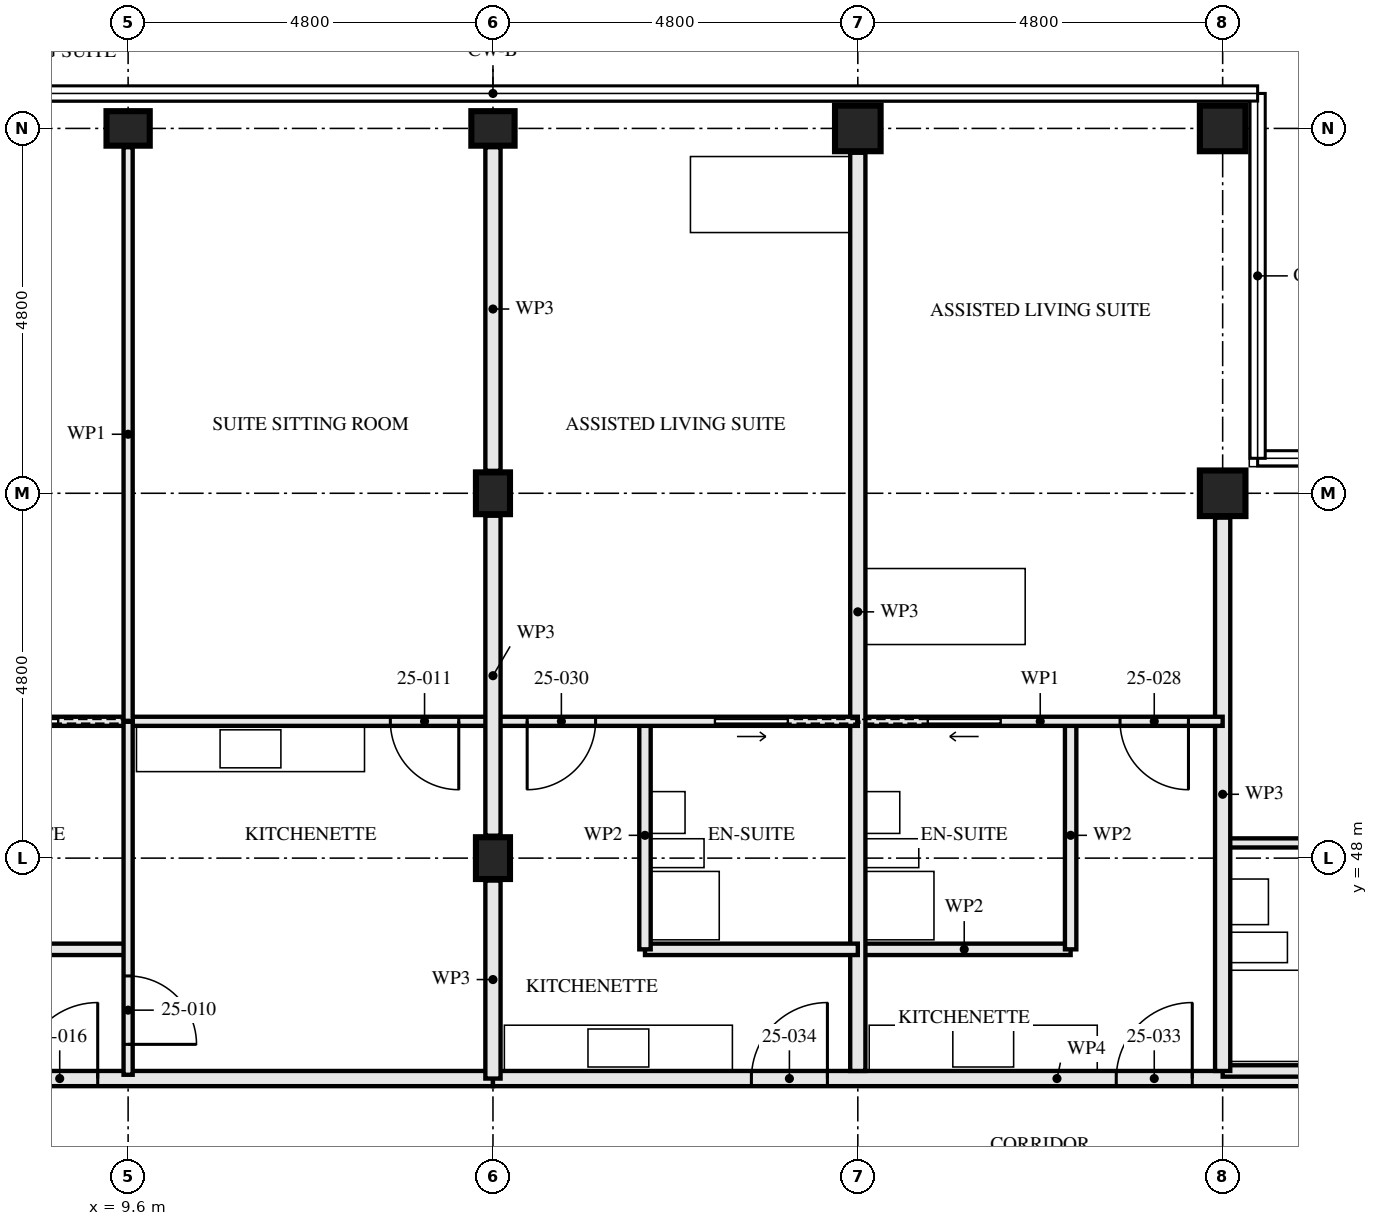
"""IFC4 building model, lengths in metres.
Left out: names, types, materials, properties, quantities, classifications, styles, units other than length and angle.
Written with IfcOpenShell. Run it as: python <this file> out.ifc"""

import sys

from ifc_helpers import new_model, si_unit, direction, frame, frame_2d, origin, origin_2d, place, context, subcontext, project, spatial, rectangle, hollow_rectangle, i_section, extrude, element, fill, save


model = new_model("IFC4")
c1 = context("Model", 3, precision=1e-05, world=origin(), true_north=direction((0.0, 1.0)))
c2 = subcontext(c1, "Body", "Model", "MODEL_VIEW")
j1 = project(units=[si_unit("LENGTHUNIT", "METRE"), si_unit("PLANEANGLEUNIT", "RADIAN")], contexts=[c1])
p1 = place(None, origin())
s1 = spatial("IfcSite", under=j1, at=p1, CompositionType="ELEMENT")
p2 = place(p1, origin())
s2 = spatial("IfcBuilding", under=s1, at=p2, CompositionType="ELEMENT")
p3 = place(p2, frame((0.0, 0.0, 94.5)))
s3 = spatial("IfcBuildingStorey", under=s2, at=p3, CompositionType="ELEMENT", Elevation=94.5)
p4 = place(p3, frame((9.6, 57.6, 0.0), z_axis=(0.0, 0.0, 1.0), x_axis=(0.0, 1.0, 0.0)))
e1 = element("IfcColumn", 1, at=p4, inside=s3, PredefinedType="COLUMN", context=c2, shape_type="SweptSolid", body=[
    extrude(i_section(OverallWidth=0.454, OverallDepth=0.569, WebThickness=0.078, FlangeThickness=0.125, FilletRadius=0.015, at=origin_2d()), origin(), (0.0, 0.0, 1.0), 3.5),
])
for number, where, z_axis, x_axis in (
    (2, (14.4, 48.0, 0.0), (0.0, 0.0, 1.0), (1.0, 0.0, 0.0)),
    (3, (14.4, 52.8, 0.0), (0.0, 0.0, 1.0), (1.0, 0.0, 0.0)),
):
    element("IfcColumn", number, at=place(p3, frame(where, z_axis=z_axis, x_axis=x_axis)), inside=s3, PredefinedType="COLUMN", context=c2, shape_type="SweptSolid", body=[
        extrude(i_section(OverallWidth=0.448, OverallDepth=0.55, WebThickness=0.072, FlangeThickness=0.115, FilletRadius=0.015, at=origin_2d()), origin(), (0.0, 0.0, 1.0), 3.5),
    ])
p5 = place(p3, frame((14.4, 57.6, 0.0), z_axis=(0.0, 0.0, 1.0), x_axis=(0.0, 1.0, 0.0)))
e4 = element("IfcColumn", 4, at=p5, inside=s3, PredefinedType="COLUMN", context=c2, shape_type="SweptSolid", body=[
    extrude(i_section(OverallWidth=0.454, OverallDepth=0.569, WebThickness=0.078, FlangeThickness=0.125, FilletRadius=0.015, at=origin_2d()), origin(), (0.0, 0.0, 1.0), 3.5),
])
for number, where, z_axis, x_axis in (
    (5, (19.2, 57.6, 0.0), (0.0, 0.0, 1.0), (0.0, 1.0, 0.0)),
    (6, (24.0, 52.8, 0.0), (0.0, 0.0, 1.0), (0.0, 1.0, 0.0)),
    (7, (24.0, 57.6, 0.0), (0.0, 0.0, 1.0), (0.0, 1.0, 0.0)),
):
    element("IfcColumn", number, at=place(p3, frame(where, z_axis=z_axis, x_axis=x_axis)), inside=s3, PredefinedType="COLUMN", context=c2, shape_type="SweptSolid", body=[
        extrude(hollow_rectangle(XDim=0.6, YDim=0.6, WallThickness=0.06, at=origin_2d()), origin(), (0.0, 0.0, 1.0), 3.5),
    ])
p6 = place(p3, frame((9.6, 46.8, 0.0), z_axis=(0.0, 0.0, 1.0), x_axis=(-1.0, 0.0, 0.0)))
e8 = element("IfcWall", 8, at=p6, inside=s3, PredefinedType="PARTITIONING", context=c2, shape_type="SweptSolid", body=[
    extrude(rectangle(XDim=2.8, YDim=0.15, at=frame_2d((1.4, 0.0))), origin(), (0.0, 0.0, 1.0), 3.33),
])
p7 = place(p3, frame((9.6, 49.8, 0.0), z_axis=(0.0, 0.0, 1.0), x_axis=(0.0, -1.0, 0.0)))
e9 = element("IfcWall", 9, at=p7, inside=s3, PredefinedType="PARTITIONING", context=c2, shape_type="SweptSolid", body=[
    extrude(rectangle(XDim=4.65, YDim=0.12, at=frame_2d((2.325, 0.0))), origin(), (0.0, 0.0, 1.0), 2.55),
])
p8 = place(p7, frame((3.35, 0.0, 0.0)))
e10 = element("IfcOpeningElement", 10, at=p8, cuts=e9, PredefinedType="OPENING", context=c2, shape_type="SweptSolid", body=[
    extrude(rectangle(XDim=0.9, YDim=2.1, at=frame_2d((0.45, 1.05))), frame((0.0, 0.071, 0.0), z_axis=(0.0, -1.0, 0.0), x_axis=(1.0, 0.0, 0.0)), (0.0, 0.0, 1.0), 0.141),
])
p9 = place(p3, frame((14.4, 49.8, 0.0), z_axis=(0.0, 0.0, 1.0), x_axis=(-1.0, 0.0, 0.0)))
e11 = element("IfcWall", 11, at=p9, inside=s3, PredefinedType="PARTITIONING", context=c2, shape_type="SweptSolid", body=[
    extrude(rectangle(XDim=4.8, YDim=0.12, at=frame_2d((2.4, 0.0))), origin(), (0.0, 0.0, 1.0), 3.33),
])
p10 = place(p9, frame((0.45, 0.0, 0.0)))
e12 = element("IfcOpeningElement", 12, at=p10, cuts=e11, PredefinedType="OPENING", context=c2, shape_type="SweptSolid", body=[
    extrude(rectangle(XDim=0.9, YDim=2.1, at=frame_2d((0.45, 1.05))), frame((0.0, 0.071, 0.0), z_axis=(0.0, -1.0, 0.0), x_axis=(1.0, 0.0, 0.0)), (0.0, 0.0, 1.0), 0.141),
])
p11 = place(p3, frame((9.6, 49.8, 0.0), z_axis=(0.0, 0.0, 1.0), x_axis=(-1.0, 0.0, 0.0)))
e13 = element("IfcWall", 13, at=p11, inside=s3, PredefinedType="PARTITIONING", context=c2, shape_type="SweptSolid", body=[
    extrude(rectangle(XDim=4.8, YDim=0.12, at=frame_2d((2.4, 0.0))), origin(), (0.0, 0.0, 1.0), 3.33),
])
p12 = place(p11, frame((3.45, 0.0, 0.0)))
e14 = element("IfcOpeningElement", 14, at=p12, cuts=e13, PredefinedType="OPENING", context=c2, shape_type="SweptSolid", body=[
    extrude(rectangle(XDim=0.9, YDim=2.1, at=frame_2d((0.45, 1.05))), frame((0.0, 0.071, 0.0), z_axis=(0.0, -1.0, 0.0), x_axis=(1.0, 0.0, 0.0)), (0.0, 0.0, 1.0), 0.141),
])
p13 = place(p11, frame((0.925, 0.0, 0.0)))
e15 = element("IfcOpeningElement", 15, at=p13, cuts=e13, PredefinedType="OPENING", context=c2, shape_type="SweptSolid", body=[
    extrude(rectangle(XDim=0.95, YDim=2.1, at=frame_2d((0.475, 1.05))), frame((0.0, 0.071, 0.0), z_axis=(0.0, -1.0, 0.0), x_axis=(1.0, 0.0, 0.0)), (0.0, 0.0, 1.0), 0.141),
])
p14 = place(p3, frame((9.6, 57.353, 0.0), z_axis=(0.0, 0.0, 1.0), x_axis=(0.0, -1.0, 0.0)))
e16 = element("IfcWall", 16, at=p14, inside=s3, PredefinedType="PARTITIONING", context=c2, shape_type="SweptSolid", body=[
    extrude(rectangle(XDim=7.553, YDim=0.12, at=frame_2d((3.776, 0.0))), origin(), (0.0, 0.0, 1.0), 2.55),
])
p15 = place(p3, frame((14.4, 45.1, 0.0), z_axis=(0.0, 0.0, 1.0), x_axis=(-1.0, 0.0, 0.0)))
e17 = element("IfcWall", 17, at=p15, inside=s3, PredefinedType="PARTITIONING", context=c2, shape_type="SweptSolid", body=[
    extrude(rectangle(XDim=9.6, YDim=0.2, at=frame_2d((4.8, 0.0))), origin(), (0.0, 0.0, 1.0), 3.33),
])
p16 = place(p15, frame((5.2, 0.0, 0.0)))
e18 = element("IfcOpeningElement", 18, at=p16, cuts=e17, PredefinedType="OPENING", context=c2, shape_type="SweptSolid", body=[
    extrude(rectangle(XDim=1.0, YDim=2.1, at=frame_2d((0.5, 1.05))), frame((0.0, 0.111, 0.0), z_axis=(0.0, -1.0, 0.0), x_axis=(1.0, 0.0, 0.0)), (0.0, 0.0, 1.0), 0.221),
])
p17 = place(p3, frame((26.8, 45.2, 0.0), z_axis=(0.0, 0.0, 1.0), x_axis=(-1.0, 0.0, 0.0)))
e19 = element("IfcWall", 19, at=p17, inside=s3, PredefinedType="PARTITIONING", context=c2, shape_type="SweptSolid", body=[
    extrude(rectangle(XDim=2.8, YDim=0.15, at=frame_2d((1.4, 0.0))), origin(), (0.0, 0.0, 1.0), 3.33),
])
p18 = place(p3, frame((28.48, 48.2, 0.0), z_axis=(0.0, 0.0, 1.0), x_axis=(-1.0, 0.0, 0.0)))
e20 = element("IfcWall", 20, at=p18, inside=s3, PredefinedType="PARTITIONING", context=c2, shape_type="SweptSolid", body=[
    extrude(rectangle(XDim=4.48, YDim=0.12, at=frame_2d((2.24, 0.0))), origin(), (0.0, 0.0, 1.0), 3.33),
])
p19 = place(p18, frame((0.605, 0.0, 0.0)))
e21 = element("IfcOpeningElement", 21, at=p19, cuts=e20, PredefinedType="OPENING", context=c2, shape_type="SweptSolid", body=[
    extrude(rectangle(XDim=0.9, YDim=2.1, at=frame_2d((0.45, 1.05))), frame((0.0, 0.071, 0.0), z_axis=(0.0, -1.0, 0.0), x_axis=(1.0, 0.0, 0.0)), (0.0, 0.0, 1.0), 0.141),
])
p20 = place(p3, frame((24.0, 52.48, 0.0), z_axis=(0.0, 0.0, 1.0), x_axis=(0.0, -1.0, 0.0)))
e22 = element("IfcWall", 22, at=p20, inside=s3, PredefinedType="PARTITIONING", context=c2, shape_type="SweptSolid", body=[
    extrude(rectangle(XDim=7.28, YDim=0.2, at=frame_2d((3.64, 0.0))), origin(), (0.0, 0.0, 1.0), 2.55),
])
p21 = place(p3, frame((22.0, 49.8, 0.0), z_axis=(0.0, 0.0, 1.0), x_axis=(0.0, -1.0, 0.0)))
e23 = element("IfcWall", 23, at=p21, inside=s3, PredefinedType="PARTITIONING", context=c2, shape_type="SweptSolid", body=[
    extrude(rectangle(XDim=3.0, YDim=0.15, at=frame_2d((1.5, 0.0))), origin(), (0.0, 0.0, 1.0), 2.55),
])
p22 = place(p3, frame((22.0, 46.8, 0.0), z_axis=(0.0, 0.0, 1.0), x_axis=(-1.0, 0.0, 0.0)))
e24 = element("IfcWall", 24, at=p22, inside=s3, PredefinedType="PARTITIONING", context=c2, shape_type="SweptSolid", body=[
    extrude(rectangle(XDim=2.8, YDim=0.15, at=frame_2d((1.4, 0.0))), origin(), (0.0, 0.0, 1.0), 3.33),
])
p23 = place(p3, frame((24.0, 49.8, 0.0), z_axis=(0.0, 0.0, 1.0), x_axis=(-1.0, 0.0, 0.0)))
e25 = element("IfcWall", 25, at=p23, inside=s3, PredefinedType="PARTITIONING", context=c2, shape_type="SweptSolid", body=[
    extrude(rectangle(XDim=4.8, YDim=0.12, at=frame_2d((2.4, 0.0))), origin(), (0.0, 0.0, 1.0), 3.33),
])
p24 = place(p23, frame((0.45, 0.0, 0.0)))
e26 = element("IfcOpeningElement", 26, at=p24, cuts=e25, PredefinedType="OPENING", context=c2, shape_type="SweptSolid", body=[
    extrude(rectangle(XDim=0.9, YDim=2.1, at=frame_2d((0.45, 1.05))), frame((0.0, 0.071, 0.0), z_axis=(0.0, -1.0, 0.0), x_axis=(1.0, 0.0, 0.0)), (0.0, 0.0, 1.0), 0.141),
])
p25 = place(p23, frame((2.925, 0.0, 0.0)))
e27 = element("IfcOpeningElement", 27, at=p25, cuts=e25, PredefinedType="OPENING", context=c2, shape_type="SweptSolid", body=[
    extrude(rectangle(XDim=0.95, YDim=2.1, at=frame_2d((0.475, 1.05))), frame((0.0, 0.071, 0.0), z_axis=(0.0, -1.0, 0.0), x_axis=(1.0, 0.0, 0.0)), (0.0, 0.0, 1.0), 0.141),
])
p26 = place(p3, frame((19.2, 57.28, 0.0), z_axis=(0.0, 0.0, 1.0), x_axis=(0.0, -1.0, 0.0)))
e28 = element("IfcWall", 28, at=p26, inside=s3, PredefinedType="PARTITIONING", context=c2, shape_type="SweptSolid", body=[
    extrude(rectangle(XDim=12.08, YDim=0.2, at=frame_2d((6.04, 0.0))), origin(), (0.0, 0.0, 1.0), 2.55),
])
p27 = place(p3, frame((16.4, 49.8, 0.0), z_axis=(0.0, 0.0, 1.0), x_axis=(0.0, -1.0, 0.0)))
e29 = element("IfcWall", 29, at=p27, inside=s3, PredefinedType="PARTITIONING", context=c2, shape_type="SweptSolid", body=[
    extrude(rectangle(XDim=3.0, YDim=0.15, at=frame_2d((1.5, 0.0))), origin(), (0.0, 0.0, 1.0), 2.55),
])
p28 = place(p3, frame((19.2, 46.8, 0.0), z_axis=(0.0, 0.0, 1.0), x_axis=(-1.0, 0.0, 0.0)))
e30 = element("IfcWall", 30, at=p28, inside=s3, PredefinedType="PARTITIONING", context=c2, shape_type="SweptSolid", body=[
    extrude(rectangle(XDim=2.8, YDim=0.15, at=frame_2d((1.4, 0.0))), origin(), (0.0, 0.0, 1.0), 3.33),
])
p29 = place(p3, frame((19.2, 49.8, 0.0), z_axis=(0.0, 0.0, 1.0), x_axis=(-1.0, 0.0, 0.0)))
e31 = element("IfcWall", 31, at=p29, inside=s3, PredefinedType="PARTITIONING", context=c2, shape_type="SweptSolid", body=[
    extrude(rectangle(XDim=4.8, YDim=0.12, at=frame_2d((2.4, 0.0))), origin(), (0.0, 0.0, 1.0), 3.33),
])
p30 = place(p29, frame((3.45, 0.0, 0.0)))
e32 = element("IfcOpeningElement", 32, at=p30, cuts=e31, PredefinedType="OPENING", context=c2, shape_type="SweptSolid", body=[
    extrude(rectangle(XDim=0.9, YDim=2.1, at=frame_2d((0.45, 1.05))), frame((0.0, 0.071, 0.0), z_axis=(0.0, -1.0, 0.0), x_axis=(1.0, 0.0, 0.0)), (0.0, 0.0, 1.0), 0.141),
])
p31 = place(p29, frame((0.925, 0.0, 0.0)))
e33 = element("IfcOpeningElement", 33, at=p31, cuts=e31, PredefinedType="OPENING", context=c2, shape_type="SweptSolid", body=[
    extrude(rectangle(XDim=0.95, YDim=2.1, at=frame_2d((0.475, 1.05))), frame((0.0, 0.071, 0.0), z_axis=(0.0, -1.0, 0.0), x_axis=(1.0, 0.0, 0.0)), (0.0, 0.0, 1.0), 0.141),
])
p32 = place(p3, frame((29.24, 45.1, 0.0), z_axis=(0.0, 0.0, 1.0), x_axis=(-1.0, 0.0, 0.0)))
e34 = element("IfcWall", 34, at=p32, inside=s3, PredefinedType="PARTITIONING", context=c2, shape_type="SweptSolid", body=[
    extrude(rectangle(XDim=14.84, YDim=0.2, at=frame_2d((7.42, 0.0))), origin(), (0.0, 0.0, 1.0), 2.32),
])
p33 = place(p32, frame((0.84, 0.0, 0.0)))
e35 = element("IfcOpeningElement", 35, at=p33, cuts=e34, PredefinedType="OPENING", context=c2, shape_type="SweptSolid", body=[
    extrude(rectangle(XDim=1.0, YDim=2.1, at=frame_2d((0.5, 1.05))), frame((0.0, 0.111, 0.0), z_axis=(0.0, -1.0, 0.0), x_axis=(1.0, 0.0, 0.0)), (0.0, 0.0, 1.0), 0.221),
])
p34 = place(p32, frame((5.64, 0.0, 0.0)))
e36 = element("IfcOpeningElement", 36, at=p34, cuts=e34, PredefinedType="OPENING", context=c2, shape_type="SweptSolid", body=[
    extrude(rectangle(XDim=1.0, YDim=2.1, at=frame_2d((0.5, 1.05))), frame((0.0, 0.111, 0.0), z_axis=(0.0, -1.0, 0.0), x_axis=(1.0, 0.0, 0.0)), (0.0, 0.0, 1.0), 0.221),
])
p35 = place(p32, frame((10.44, 0.0, 0.0)))
e37 = element("IfcOpeningElement", 37, at=p35, cuts=e34, PredefinedType="OPENING", context=c2, shape_type="SweptSolid", body=[
    extrude(rectangle(XDim=1.0, YDim=2.1, at=frame_2d((0.5, 1.05))), frame((0.0, 0.111, 0.0), z_axis=(0.0, -1.0, 0.0), x_axis=(1.0, 0.0, 0.0)), (0.0, 0.0, 1.0), 0.221),
])
p36 = place(p3, frame((14.4, 45.1, 0.0), z_axis=(0.0, 0.0, 1.0), x_axis=(0.0, 1.0, 0.0)))
e38 = element("IfcWall", 38, at=p36, inside=s3, PredefinedType="PARTITIONING", context=c2, shape_type="SweptSolid", body=[
    extrude(rectangle(XDim=2.605, YDim=0.2, at=frame_2d((1.302, 0.0))), origin(), (0.0, 0.0, 1.0), 2.32),
])
p37 = place(p3, frame((14.4, 48.295, 0.0), z_axis=(0.0, 0.0, 1.0), x_axis=(0.0, 1.0, 0.0)))
e39 = element("IfcWall", 39, at=p37, inside=s3, PredefinedType="PARTITIONING", context=c2, shape_type="SweptSolid", body=[
    extrude(rectangle(XDim=4.21, YDim=0.2, at=frame_2d((2.105, 0.0))), origin(), (0.0, 0.0, 1.0), 2.32),
])
p38 = place(p3, frame((14.4, 53.095, 0.0), z_axis=(0.0, 0.0, 1.0), x_axis=(0.0, 1.0, 0.0)))
e40 = element("IfcWall", 40, at=p38, inside=s3, PredefinedType="PARTITIONING", context=c2, shape_type="SweptSolid", body=[
    extrude(rectangle(XDim=4.258, YDim=0.2, at=frame_2d((2.129, 0.0))), origin(), (0.0, 0.0, 1.0), 2.32),
])
p39 = place(p8, origin())
e41 = element("IfcDoor", 41, at=p39, inside=s3, OperationType="SINGLE_SWING_LEFT", PredefinedType="DOOR", context=c2, shape_type="SweptSolid", body=[
    extrude(rectangle(XDim=0.9, YDim=2.1, at=frame_2d((0.45, 1.05))), frame((0.0, 0.022, 0.0), z_axis=(0.0, -1.0, 0.0), x_axis=(1.0, 0.0, 0.0)), (0.0, 0.0, 1.0), 0.044),
])
fill(e10, e41)
p40 = place(p10, origin())
e42 = element("IfcDoor", 42, at=p40, inside=s3, OperationType="SINGLE_SWING_RIGHT", PredefinedType="DOOR", context=c2, shape_type="SweptSolid", body=[
    extrude(rectangle(XDim=0.9, YDim=2.1, at=frame_2d((0.45, 1.05))), frame((0.0, 0.022, 0.0), z_axis=(0.0, -1.0, 0.0), x_axis=(1.0, 0.0, 0.0)), (0.0, 0.0, 1.0), 0.044),
])
fill(e12, e42)
p41 = place(p13, origin())
e43 = element("IfcDoor", 43, at=p41, inside=s3, OperationType="SLIDING_TO_RIGHT", PredefinedType="DOOR", context=c2, shape_type="SweptSolid", body=[
    extrude(rectangle(XDim=0.95, YDim=2.1, at=frame_2d((0.475, 1.05))), frame((0.0, 0.022, 0.0), z_axis=(0.0, -1.0, 0.0), x_axis=(1.0, 0.0, 0.0)), (0.0, 0.0, 1.0), 0.044),
])
fill(e15, e43)
p42 = place(p16, frame((1.0, 0.0, 0.0), z_axis=(0.0, 0.0, 1.0), x_axis=(-1.0, 0.0, 0.0)))
e44 = element("IfcDoor", 44, at=p42, inside=s3, OperationType="SINGLE_SWING_LEFT", PredefinedType="DOOR", context=c2, shape_type="SweptSolid", body=[
    extrude(rectangle(XDim=1.0, YDim=2.1, at=frame_2d((0.5, 1.05))), frame((0.0, 0.027, 0.0), z_axis=(0.0, -1.0, 0.0), x_axis=(1.0, 0.0, 0.0)), (0.0, 0.0, 1.0), 0.054),
])
fill(e18, e44)
p43 = place(p24, origin())
e45 = element("IfcDoor", 45, at=p43, inside=s3, OperationType="SINGLE_SWING_RIGHT", PredefinedType="DOOR", context=c2, shape_type="SweptSolid", body=[
    extrude(rectangle(XDim=0.9, YDim=2.1, at=frame_2d((0.45, 1.05))), frame((0.0, 0.022, 0.0), z_axis=(0.0, -1.0, 0.0), x_axis=(1.0, 0.0, 0.0)), (0.0, 0.0, 1.0), 0.044),
])
fill(e26, e45)
p44 = place(p25, origin())
e46 = element("IfcDoor", 46, at=p44, inside=s3, OperationType="SLIDING_TO_LEFT", PredefinedType="DOOR", context=c2, shape_type="SweptSolid", body=[
    extrude(rectangle(XDim=0.95, YDim=2.1, at=frame_2d((0.475, 1.05))), frame((0.0, 0.022, 0.0), z_axis=(0.0, -1.0, 0.0), x_axis=(1.0, 0.0, 0.0)), (0.0, 0.0, 1.0), 0.044),
])
fill(e27, e46)
p45 = place(p30, origin())
e47 = element("IfcDoor", 47, at=p45, inside=s3, OperationType="SINGLE_SWING_LEFT", PredefinedType="DOOR", context=c2, shape_type="SweptSolid", body=[
    extrude(rectangle(XDim=0.9, YDim=2.1, at=frame_2d((0.45, 1.05))), frame((0.0, 0.022, 0.0), z_axis=(0.0, -1.0, 0.0), x_axis=(1.0, 0.0, 0.0)), (0.0, 0.0, 1.0), 0.044),
])
fill(e32, e47)
p46 = place(p31, origin())
e48 = element("IfcDoor", 48, at=p46, inside=s3, OperationType="SLIDING_TO_RIGHT", PredefinedType="DOOR", context=c2, shape_type="SweptSolid", body=[
    extrude(rectangle(XDim=0.95, YDim=2.1, at=frame_2d((0.475, 1.05))), frame((0.0, 0.022, 0.0), z_axis=(0.0, -1.0, 0.0), x_axis=(1.0, 0.0, 0.0)), (0.0, 0.0, 1.0), 0.044),
])
fill(e33, e48)
p47 = place(p34, frame((1.0, 0.0, 0.0), z_axis=(0.0, 0.0, 1.0), x_axis=(-1.0, 0.0, 0.0)))
e49 = element("IfcDoor", 49, at=p47, inside=s3, OperationType="SINGLE_SWING_LEFT", PredefinedType="DOOR", context=c2, shape_type="SweptSolid", body=[
    extrude(rectangle(XDim=1.0, YDim=2.1, at=frame_2d((0.5, 1.05))), frame((0.0, 0.027, 0.0), z_axis=(0.0, -1.0, 0.0), x_axis=(1.0, 0.0, 0.0)), (0.0, 0.0, 1.0), 0.054),
])
fill(e36, e49)
p48 = place(p35, frame((1.0, 0.0, 0.0), z_axis=(0.0, 0.0, 1.0), x_axis=(-1.0, 0.0, 0.0)))
e50 = element("IfcDoor", 50, at=p48, inside=s3, OperationType="SINGLE_SWING_LEFT", PredefinedType="DOOR", context=c2, shape_type="SweptSolid", body=[
    extrude(rectangle(XDim=1.0, YDim=2.1, at=frame_2d((0.5, 1.05))), frame((0.0, 0.027, 0.0), z_axis=(0.0, -1.0, 0.0), x_axis=(1.0, 0.0, 0.0)), (0.0, 0.0, 1.0), 0.054),
])
fill(e37, e50)
save(model, sys.argv[1])
